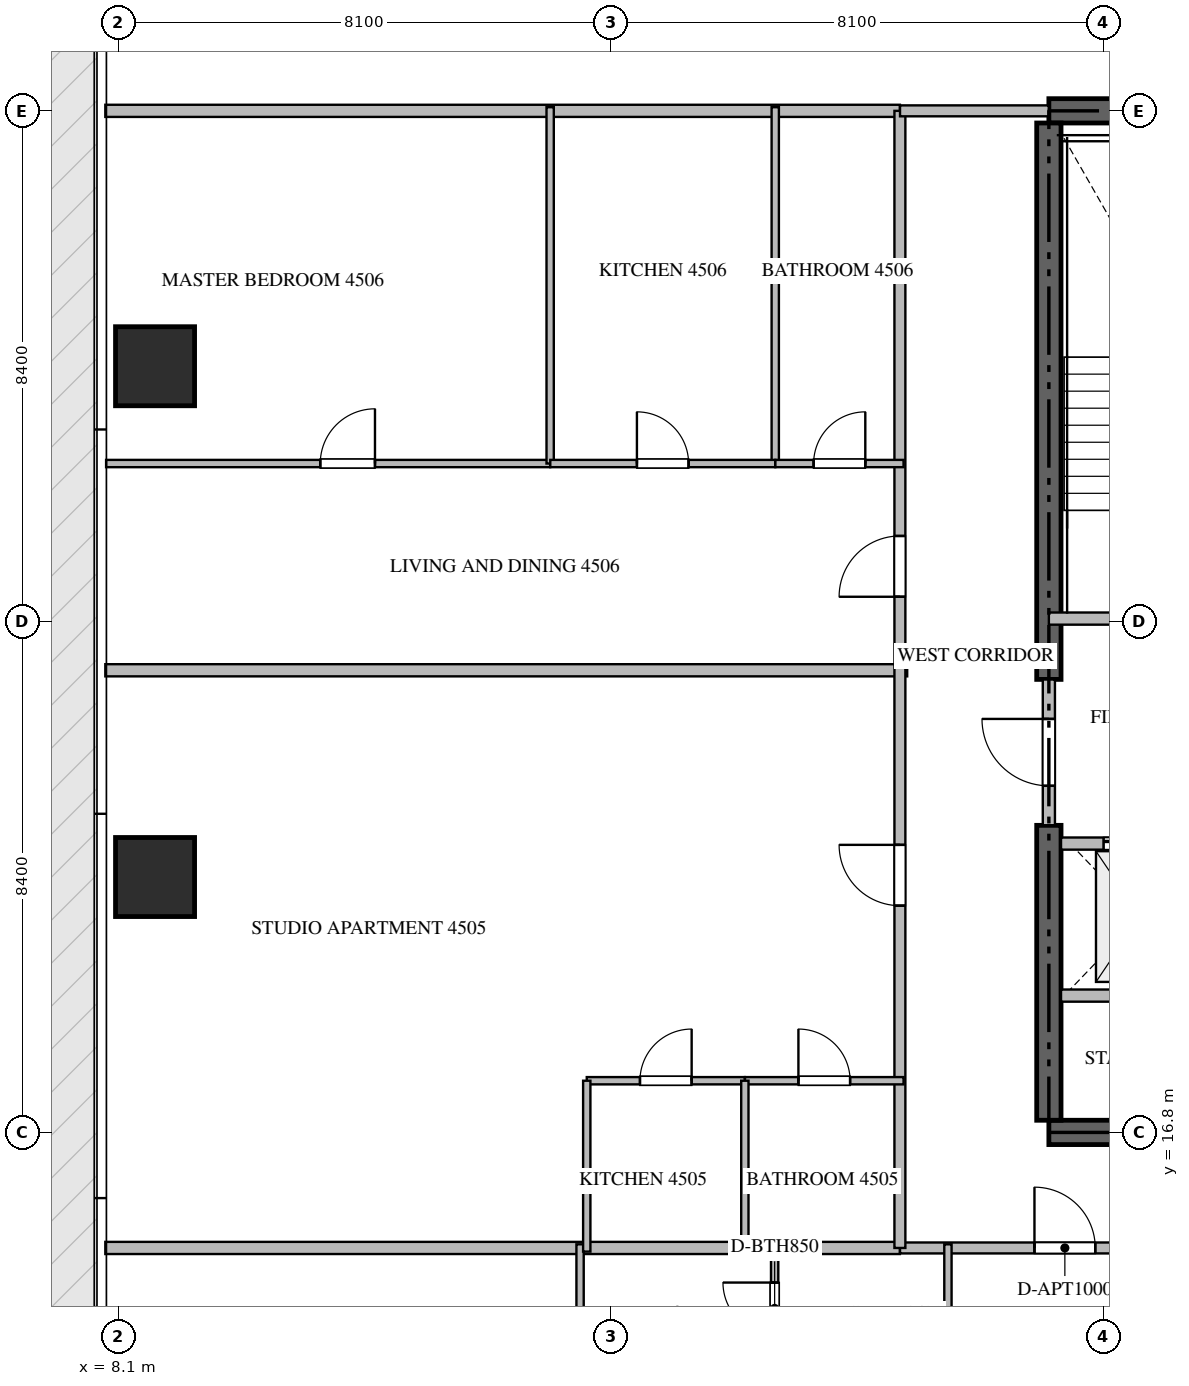
"""IFC4 building model, lengths in metres.
Left out: names, types, materials, properties, quantities, classifications, styles, units other than length and angle.
Written with IfcOpenShell. Run it as: python <this file> out.ifc"""

import sys

from ifc_helpers import new_model, si_unit, direction, frame, frame_2d, origin, origin_2d, place, context, subcontext, project, spatial, rectangle, extrude, source, transform, mapped, element, fill, save


model = new_model("IFC4")
c1 = context("Model", 3, precision=1e-05, world=origin(), true_north=direction((0.0, 1.0)))
c2 = subcontext(c1, "Body", "Model", "MODEL_VIEW")
j1 = project(units=[si_unit("LENGTHUNIT", "METRE"), si_unit("PLANEANGLEUNIT", "RADIAN")], contexts=[c1])
p1 = place(None, origin())
s1 = spatial("IfcSite", under=j1, at=p1, CompositionType="ELEMENT")
p2 = place(p1, origin())
s2 = spatial("IfcBuilding", under=s1, at=p2, CompositionType="ELEMENT")
p3 = place(p2, frame((0.0, 0.0, 180.15)))
s3 = spatial("IfcBuildingStorey", under=s2, at=p3, CompositionType="ELEMENT", Elevation=180.15)
for number, where, z_axis, x_axis in (
    (1, (23.4, 16.8, -0.26), (0.0, 0.0, 1.0), (1.0, 0.0, 0.0)),
    (2, (41.4, 33.6, -0.26), (0.0, 0.0, 1.0), (-1.0, 0.0, 0.0)),
):
    element("IfcWall", number, at=place(p3, frame(where, z_axis=z_axis, x_axis=x_axis)), inside=s3, PredefinedType="SHEAR", context=c2, shape_type="SweptSolid", body=[
        extrude(rectangle(XDim=18.0, YDim=0.4, at=frame_2d((9.0, 0.0))), origin(), (0.0, 0.0, 1.0), 3.748),
    ])
p4 = place(p3, frame((23.4, 17.0, -0.26), z_axis=(0.0, 0.0, 1.0), x_axis=(0.0, 1.0, 0.0)))
e3 = element("IfcWall", 3, at=p4, inside=s3, PredefinedType="SHEAR", context=c2, shape_type="SweptSolid", body=[
    extrude(rectangle(XDim=4.85, YDim=0.4, at=frame_2d((2.425, 0.0))), origin(), (0.0, 0.0, 1.0), 3.748),
])
p5 = place(p3, frame((23.4, 24.25, -0.26), z_axis=(0.0, 0.0, 1.0), x_axis=(0.0, 1.0, 0.0)))
e4 = element("IfcWall", 4, at=p5, inside=s3, PredefinedType="SHEAR", context=c2, shape_type="SweptSolid", body=[
    extrude(rectangle(XDim=9.15, YDim=0.4, at=frame_2d((4.575, 0.0))), origin(), (0.0, 0.0, 1.0), 3.748),
])
m1 = source(origin(), c2, "Body", "SweptSolid", [
    extrude(rectangle(XDim=1.3, YDim=1.3, at=origin_2d()), origin(), (0.0, 0.0, 1.0), 3.75),
])
for number, where, z_axis, x_axis in (
    (5, (8.7, 21.0, -0.26), (0.0, 0.0, 1.0), (1.0, 0.0, 0.0)),
    (6, (8.7, 29.4, -0.26), (0.0, 0.0, 1.0), (1.0, 0.0, 0.0)),
):
    element("IfcColumn", number, at=place(p3, frame(where, z_axis=z_axis, x_axis=x_axis)), inside=s3, PredefinedType="COLUMN", context=c2, shape_type="MappedRepresentation", body=[
        mapped(m1, transform((0.0, 0.0, 0.0), scale=1.0)),
    ])
p6 = place(p3, frame((23.4, 25.25, 0.0), z_axis=(0.0, 0.0, 1.0), x_axis=(1.0, 0.0, 0.0)))
e7 = element("IfcWall", 7, at=p6, inside=s3, PredefinedType="STANDARD", context=c2, shape_type="SweptSolid", body=[
    extrude(rectangle(XDim=4.45, YDim=0.2, at=frame_2d((2.225, 0.0))), origin(), (0.0, 0.0, 1.0), 3.49),
])
p7 = place(p6, frame((1.65, 0.0, 0.0)))
e8 = element("IfcOpeningElement", 8, at=p7, cuts=e7, PredefinedType="OPENING", context=c2, shape_type="SweptSolid", body=[
    extrude(rectangle(XDim=1.1, YDim=2.15, at=frame_2d((0.55, 1.075))), frame((0.0, 0.11, 0.0), z_axis=(0.0, -1.0, 0.0), x_axis=(1.0, 0.0, 0.0)), (0.0, 0.0, 1.0), 0.22),
])
p8 = place(p3, frame((23.6, 21.55, 0.0), z_axis=(0.0, 0.0, 1.0), x_axis=(1.0, 0.0, 0.0)))
e9 = element("IfcWall", 9, at=p8, inside=s3, PredefinedType="STANDARD", context=c2, shape_type="SweptSolid", body=[
    extrude(rectangle(XDim=2.45, YDim=0.2, at=frame_2d((1.225, 0.0))), origin(), (0.0, 0.0, 1.0), 3.49),
])
p9 = place(p8, frame((0.7, 0.0, 0.0)))
e10 = element("IfcOpeningElement", 10, at=p9, cuts=e9, PredefinedType="OPENING", context=c2, shape_type="SweptSolid", body=[
    extrude(rectangle(XDim=1.2, YDim=2.2, at=frame_2d((0.6, 1.1))), frame((0.0, 0.11, 0.0), z_axis=(0.0, -1.0, 0.0), x_axis=(1.0, 0.0, 0.0)), (0.0, 0.0, 1.0), 0.22),
])
p10 = place(p3, frame((23.6, 19.05, 0.0), z_axis=(0.0, 0.0, 1.0), x_axis=(1.0, 0.0, 0.0)))
e11 = element("IfcWall", 11, at=p10, inside=s3, PredefinedType="STANDARD", context=c2, shape_type="SweptSolid", body=[
    extrude(rectangle(XDim=2.45, YDim=0.2, at=frame_2d((1.225, 0.0))), origin(), (0.0, 0.0, 1.0), 3.49),
])
p11 = place(p3, frame((23.4, 21.852, 0.0), z_axis=(0.0, 0.0, 1.0), x_axis=(0.0, 1.0, 0.0)))
e12 = element("IfcWall", 12, at=p11, inside=s3, PredefinedType="STANDARD", context=c2, shape_type="SweptSolid", body=[
    extrude(rectangle(XDim=2.396, YDim=0.2, at=frame_2d((1.198, 0.0))), origin(), (0.0, 0.0, 1.0), 3.49),
])
p12 = place(p11, frame((0.648, 0.0, 0.0)))
e13 = element("IfcOpeningElement", 13, at=p12, cuts=e12, PredefinedType="OPENING", context=c2, shape_type="SweptSolid", body=[
    extrude(rectangle(XDim=1.1, YDim=2.15, at=frame_2d((0.55, 1.075))), frame((0.0, 0.11, 0.0), z_axis=(0.0, -1.0, 0.0), x_axis=(1.0, 0.0, 0.0)), (0.0, 0.0, 1.0), 0.22),
])
p13 = place(p3, frame((7.882, 24.4, 0.0), z_axis=(0.0, 0.0, 1.0), x_axis=(1.0, 0.0, 0.0)))
e14 = element("IfcWall", 14, at=p13, inside=s3, PredefinedType="PARTITIONING", context=c2, shape_type="SweptSolid", body=[
    extrude(rectangle(XDim=13.188, YDim=0.2, at=frame_2d((6.594, 0.0))), origin(), (0.0, 0.0, 1.0), 3.49),
])
for number, where, z_axis, x_axis in (
    (15, (7.882, 14.9, 0.0), (0.0, 0.0, 1.0), (1.0, 0.0, 0.0)),
    (16, (7.882, 33.6, 0.0), (0.0, 0.0, 1.0), (1.0, 0.0, 0.0)),
):
    element("IfcWall", number, at=place(p3, frame(where, z_axis=z_axis, x_axis=x_axis)), inside=s3, PredefinedType="PARTITIONING", context=c2, shape_type="SweptSolid", body=[
        extrude(rectangle(XDim=13.068, YDim=0.2, at=frame_2d((6.534, 0.0))), origin(), (0.0, 0.0, 1.0), 3.49),
    ])
p14 = place(p3, frame((20.952, 14.9, 0.0), z_axis=(0.0, 0.0, 1.0), x_axis=(1.0, 0.0, 0.0)))
e17 = element("IfcWall", 17, at=p14, inside=s3, PredefinedType="PARTITIONING", context=c2, shape_type="SweptSolid", body=[
    extrude(rectangle(XDim=22.896, YDim=0.18, at=frame_2d((11.448, 0.0))), origin(), (0.0, 0.0, 1.0), 3.49),
])
p15 = place(p14, frame((2.211, 0.0, 0.0)))
e18 = element("IfcOpeningElement", 18, at=p15, cuts=e17, PredefinedType="OPENING", context=c2, shape_type="SweptSolid", body=[
    extrude(rectangle(XDim=1.0, YDim=2.15, at=frame_2d((0.5, 1.075))), frame((0.0, 0.1, 0.0), z_axis=(0.0, -1.0, 0.0), x_axis=(1.0, 0.0, 0.0)), (0.0, 0.0, 1.0), 0.2),
])
p16 = place(p14, frame((6.7, 0.0, 0.0)))
e19 = element("IfcOpeningElement", 19, at=p16, cuts=e17, PredefinedType="OPENING", context=c2, shape_type="SweptSolid", body=[
    extrude(rectangle(XDim=1.0, YDim=2.15, at=frame_2d((0.5, 1.075))), frame((0.0, 0.1, 0.0), z_axis=(0.0, -1.0, 0.0), x_axis=(1.0, 0.0, 0.0)), (0.0, 0.0, 1.0), 0.2),
])
p17 = place(p14, frame((19.509, 0.0, 0.0)))
e20 = element("IfcOpeningElement", 20, at=p17, cuts=e17, PredefinedType="OPENING", context=c2, shape_type="SweptSolid", body=[
    extrude(rectangle(XDim=1.0, YDim=2.15, at=frame_2d((0.5, 1.075))), frame((0.0, 0.1, 0.0), z_axis=(0.0, -1.0, 0.0), x_axis=(1.0, 0.0, 0.0)), (0.0, 0.0, 1.0), 0.2),
])
p18 = place(p3, frame((20.95, 14.9, 0.0), z_axis=(0.0, 0.0, 1.0), x_axis=(0.0, 1.0, 0.0)))
e21 = element("IfcWall", 21, at=p18, inside=s3, PredefinedType="PARTITIONING", context=c2, shape_type="SweptSolid", body=[
    extrude(rectangle(XDim=18.7, YDim=0.18, at=frame_2d((9.35, 0.0))), origin(), (0.0, 0.0, 1.0), 3.49),
])
p19 = place(p18, frame((5.629, 0.0, 0.0)))
e22 = element("IfcOpeningElement", 22, at=p19, cuts=e21, PredefinedType="OPENING", context=c2, shape_type="SweptSolid", body=[
    extrude(rectangle(XDim=1.0, YDim=2.15, at=frame_2d((0.5, 1.075))), frame((0.0, 0.1, 0.0), z_axis=(0.0, -1.0, 0.0), x_axis=(1.0, 0.0, 0.0)), (0.0, 0.0, 1.0), 0.2),
])
p20 = place(p18, frame((10.709, 0.0, 0.0)))
e23 = element("IfcOpeningElement", 23, at=p20, cuts=e21, PredefinedType="OPENING", context=c2, shape_type="SweptSolid", body=[
    extrude(rectangle(XDim=1.0, YDim=2.15, at=frame_2d((0.5, 1.075))), frame((0.0, 0.1, 0.0), z_axis=(0.0, -1.0, 0.0), x_axis=(1.0, 0.0, 0.0)), (0.0, 0.0, 1.0), 0.2),
])
p21 = place(p3, frame((20.952, 33.6, 0.0), z_axis=(0.0, 0.0, 1.0), x_axis=(1.0, 0.0, 0.0)))
e24 = element("IfcWall", 24, at=p21, inside=s3, PredefinedType="PARTITIONING", context=c2, shape_type="SweptSolid", body=[
    extrude(rectangle(XDim=2.446, YDim=0.18, at=frame_2d((1.223, 0.0))), origin(), (0.0, 0.0, 1.0), 3.49),
])
p22 = place(p3, frame((21.74, 12.15, 0.0), z_axis=(0.0, 0.0, 1.0), x_axis=(0.0, 1.0, 0.0)))
e25 = element("IfcWall", 25, at=p22, inside=s3, PredefinedType="PARTITIONING", context=c2, shape_type="SweptSolid", body=[
    extrude(rectangle(XDim=2.81, YDim=0.12, at=frame_2d((1.405, 0.0))), origin(), (0.0, 0.0, 1.0), 3.49),
])
p23 = place(p3, frame((15.69, 12.85, 0.0), z_axis=(0.0, 0.0, 1.0), x_axis=(0.0, 1.0, 0.0)))
e26 = element("IfcWall", 26, at=p23, inside=s3, PredefinedType="PARTITIONING", context=c2, shape_type="SweptSolid", body=[
    extrude(rectangle(XDim=2.11, YDim=0.12, at=frame_2d((1.055, 0.0))), origin(), (0.0, 0.0, 1.0), 3.49),
])
p24 = place(p3, frame((18.89, 12.852, 0.0), z_axis=(0.0, 0.0, 1.0), x_axis=(0.0, 1.0, 0.0)))
e27 = element("IfcWall", 27, at=p24, inside=s3, PredefinedType="PARTITIONING", context=c2, shape_type="SweptSolid", body=[
    extrude(rectangle(XDim=2.108, YDim=0.12, at=frame_2d((1.054, 0.0))), origin(), (0.0, 0.0, 1.0), 3.49),
])
p25 = place(p24, frame((0.629, 0.0, 0.0)))
e28 = element("IfcOpeningElement", 28, at=p25, cuts=e27, PredefinedType="OPENING", context=c2, shape_type="SweptSolid", body=[
    extrude(rectangle(XDim=0.85, YDim=2.1, at=frame_2d((0.425, 1.05))), frame((0.0, 0.07, 0.0), z_axis=(0.0, -1.0, 0.0), x_axis=(1.0, 0.0, 0.0)), (0.0, 0.0, 1.0), 0.14),
])
p26 = place(p3, frame((15.8, 17.65, 0.0), z_axis=(0.0, 0.0, 1.0), x_axis=(1.0, 0.0, 0.0)))
e29 = element("IfcWall", 29, at=p26, inside=s3, PredefinedType="PARTITIONING", context=c2, shape_type="SweptSolid", body=[
    extrude(rectangle(XDim=2.6, YDim=0.12, at=frame_2d((1.3, 0.0))), origin(), (0.0, 0.0, 1.0), 3.49),
])
p27 = place(p26, frame((0.875, 0.0, 0.0)))
e30 = element("IfcOpeningElement", 30, at=p27, cuts=e29, PredefinedType="OPENING", context=c2, shape_type="SweptSolid", body=[
    extrude(rectangle(XDim=0.85, YDim=2.1, at=frame_2d((0.425, 1.05))), frame((0.0, 0.07, 0.0), z_axis=(0.0, -1.0, 0.0), x_axis=(1.0, 0.0, 0.0)), (0.0, 0.0, 1.0), 0.14),
])
p28 = place(p3, frame((18.402, 17.65, 0.0), z_axis=(0.0, 0.0, 1.0), x_axis=(1.0, 0.0, 0.0)))
e31 = element("IfcWall", 31, at=p28, inside=s3, PredefinedType="PARTITIONING", context=c2, shape_type="SweptSolid", body=[
    extrude(rectangle(XDim=2.608, YDim=0.12, at=frame_2d((1.304, 0.0))), origin(), (0.0, 0.0, 1.0), 3.49),
])
p29 = place(p28, frame((0.879, 0.0, 0.0)))
e32 = element("IfcOpeningElement", 32, at=p29, cuts=e31, PredefinedType="OPENING", context=c2, shape_type="SweptSolid", body=[
    extrude(rectangle(XDim=0.85, YDim=2.1, at=frame_2d((0.425, 1.05))), frame((0.0, 0.07, 0.0), z_axis=(0.0, -1.0, 0.0), x_axis=(1.0, 0.0, 0.0)), (0.0, 0.0, 1.0), 0.14),
])
for number, where, z_axis, x_axis in (
    (33, (18.4, 14.84, 0.0), (0.0, 0.0, 1.0), (0.0, 1.0, 0.0)),
    (34, (15.8, 14.84, 0.0), (0.0, 0.0, 1.0), (0.0, 1.0, 0.0)),
):
    element("IfcWall", number, at=place(p3, frame(where, z_axis=z_axis, x_axis=x_axis)), inside=s3, PredefinedType="PARTITIONING", context=c2, shape_type="SweptSolid", body=[
        extrude(rectangle(XDim=2.81, YDim=0.12, at=frame_2d((1.405, 0.0))), origin(), (0.0, 0.0, 1.0), 3.49),
    ])
p30 = place(p3, frame((7.895, 27.8, 0.0), z_axis=(0.0, 0.0, 1.0), x_axis=(1.0, 0.0, 0.0)))
e35 = element("IfcWall", 35, at=p30, inside=s3, PredefinedType="PARTITIONING", context=c2, shape_type="SweptSolid", body=[
    extrude(rectangle(XDim=7.303, YDim=0.12, at=frame_2d((3.651, 0.0))), origin(), (0.0, 0.0, 1.0), 3.49),
])
p31 = place(p30, frame((3.522, 0.0, 0.0)))
e36 = element("IfcOpeningElement", 36, at=p31, cuts=e35, PredefinedType="OPENING", context=c2, shape_type="SweptSolid", body=[
    extrude(rectangle(XDim=0.9, YDim=2.1, at=frame_2d((0.45, 1.05))), frame((0.0, 0.07, 0.0), z_axis=(0.0, -1.0, 0.0), x_axis=(1.0, 0.0, 0.0)), (0.0, 0.0, 1.0), 0.14),
])
for number, where, z_axis, x_axis in (
    (37, (15.198, 27.8, 0.0), (0.0, 0.0, 1.0), (0.0, 1.0, 0.0)),
    (38, (18.9, 27.8, 0.0), (0.0, 0.0, 1.0), (0.0, 1.0, 0.0)),
):
    element("IfcWall", number, at=place(p3, frame(where, z_axis=z_axis, x_axis=x_axis)), inside=s3, PredefinedType="PARTITIONING", context=c2, shape_type="SweptSolid", body=[
        extrude(rectangle(XDim=5.86, YDim=0.12, at=frame_2d((2.93, 0.0))), origin(), (0.0, 0.0, 1.0), 3.49),
    ])
p32 = place(p3, frame((15.2, 27.8, 0.0), z_axis=(0.0, 0.0, 1.0), x_axis=(1.0, 0.0, 0.0)))
e39 = element("IfcWall", 39, at=p32, inside=s3, PredefinedType="PARTITIONING", context=c2, shape_type="SweptSolid", body=[
    extrude(rectangle(XDim=3.7, YDim=0.12, at=frame_2d((1.85, 0.0))), origin(), (0.0, 0.0, 1.0), 3.49),
])
p33 = place(p32, frame((1.425, 0.0, 0.0)))
e40 = element("IfcOpeningElement", 40, at=p33, cuts=e39, PredefinedType="OPENING", context=c2, shape_type="SweptSolid", body=[
    extrude(rectangle(XDim=0.85, YDim=2.1, at=frame_2d((0.425, 1.05))), frame((0.0, 0.07, 0.0), z_axis=(0.0, -1.0, 0.0), x_axis=(1.0, 0.0, 0.0)), (0.0, 0.0, 1.0), 0.14),
])
p34 = place(p3, frame((18.902, 27.8, 0.0), z_axis=(0.0, 0.0, 1.0), x_axis=(1.0, 0.0, 0.0)))
e41 = element("IfcWall", 41, at=p34, inside=s3, PredefinedType="PARTITIONING", context=c2, shape_type="SweptSolid", body=[
    extrude(rectangle(XDim=2.108, YDim=0.12, at=frame_2d((1.054, 0.0))), origin(), (0.0, 0.0, 1.0), 3.49),
])
p35 = place(p34, frame((0.629, 0.0, 0.0)))
e42 = element("IfcOpeningElement", 42, at=p35, cuts=e41, PredefinedType="OPENING", context=c2, shape_type="SweptSolid", body=[
    extrude(rectangle(XDim=0.85, YDim=2.1, at=frame_2d((0.425, 1.05))), frame((0.0, 0.07, 0.0), z_axis=(0.0, -1.0, 0.0), x_axis=(1.0, 0.0, 0.0)), (0.0, 0.0, 1.0), 0.14),
])
m2 = source(origin(), c2, "Body", "SweptSolid", [
    extrude(rectangle(XDim=1.2, YDim=2.2, at=frame_2d((0.6, 1.1))), frame((0.0, 0.025, 0.0), z_axis=(0.0, -1.0, 0.0), x_axis=(1.0, 0.0, 0.0)), (0.0, 0.0, 1.0), 0.05),
])
p36 = place(p9, origin())
e43 = element("IfcDoor", 43, at=p36, inside=s3, OperationType="DOUBLE_DOOR_SLIDING", PredefinedType="DOOR", context=c2, shape_type="MappedRepresentation", body=[
    mapped(m2, transform((0.0, 0.0, 0.0), scale=1.0)),
])
fill(e10, e43)
m3 = source(origin(), c2, "Body", "SweptSolid", [
    extrude(rectangle(XDim=1.1, YDim=2.15, at=frame_2d((0.55, 1.075))), frame((0.0, 0.025, 0.0), z_axis=(0.0, -1.0, 0.0), x_axis=(1.0, 0.0, 0.0)), (0.0, 0.0, 1.0), 0.05),
])
p37 = place(p12, origin())
e44 = element("IfcDoor", 44, at=p37, inside=s3, OperationType="SINGLE_SWING_RIGHT", PredefinedType="DOOR", context=c2, shape_type="MappedRepresentation", body=[
    mapped(m3, transform((0.0, 0.0, 0.0), scale=1.0)),
])
fill(e13, e44)
m4 = source(origin(), c2, "Body", "SweptSolid", [
    extrude(rectangle(XDim=1.0, YDim=2.15, at=frame_2d((0.5, 1.075))), frame((0.0, 0.025, 0.0), z_axis=(0.0, -1.0, 0.0), x_axis=(1.0, 0.0, 0.0)), (0.0, 0.0, 1.0), 0.05),
])
p38 = place(p15, origin())
e45 = element("IfcDoor", 45, at=p38, inside=s3, OperationType="SINGLE_SWING_LEFT", PredefinedType="DOOR", context=c2, shape_type="MappedRepresentation", body=[
    mapped(m4, transform((0.0, 0.0, 0.0), scale=1.0)),
])
fill(e18, e45)
p39 = place(p19, origin())
e46 = element("IfcDoor", 46, at=p39, inside=s3, OperationType="SINGLE_SWING_RIGHT", PredefinedType="DOOR", context=c2, shape_type="MappedRepresentation", body=[
    mapped(m4, transform((0.0, 0.0, 0.0), scale=1.0)),
])
fill(e22, e46)
p40 = place(p20, origin())
e47 = element("IfcDoor", 47, at=p40, inside=s3, OperationType="SINGLE_SWING_LEFT", PredefinedType="DOOR", context=c2, shape_type="MappedRepresentation", body=[
    mapped(m4, transform((0.0, 0.0, 0.0), scale=1.0)),
])
fill(e23, e47)
m5 = source(origin(), c2, "Body", "SweptSolid", [
    extrude(rectangle(XDim=0.85, YDim=2.1, at=frame_2d((0.425, 1.05))), frame((0.0, 0.025, 0.0), z_axis=(0.0, -1.0, 0.0), x_axis=(1.0, 0.0, 0.0)), (0.0, 0.0, 1.0), 0.05),
])
p41 = place(p25, origin())
e48 = element("IfcDoor", 48, at=p41, inside=s3, OperationType="SINGLE_SWING_RIGHT", PredefinedType="DOOR", context=c2, shape_type="MappedRepresentation", body=[
    mapped(m5, transform((0.0, 0.0, 0.0), scale=1.0)),
])
fill(e28, e48)
p42 = place(p27, origin())
e49 = element("IfcDoor", 49, at=p42, inside=s3, OperationType="SINGLE_SWING_RIGHT", PredefinedType="DOOR", context=c2, shape_type="MappedRepresentation", body=[
    mapped(m5, transform((0.0, 0.0, 0.0), scale=1.0)),
])
fill(e30, e49)
p43 = place(p29, origin())
e50 = element("IfcDoor", 50, at=p43, inside=s3, OperationType="SINGLE_SWING_LEFT", PredefinedType="DOOR", context=c2, shape_type="MappedRepresentation", body=[
    mapped(m5, transform((0.0, 0.0, 0.0), scale=1.0)),
])
fill(e32, e50)
m6 = source(origin(), c2, "Body", "SweptSolid", [
    extrude(rectangle(XDim=0.9, YDim=2.1, at=frame_2d((0.45, 1.05))), frame((0.0, 0.025, 0.0), z_axis=(0.0, -1.0, 0.0), x_axis=(1.0, 0.0, 0.0)), (0.0, 0.0, 1.0), 0.05),
])
p44 = place(p31, origin())
e51 = element("IfcDoor", 51, at=p44, inside=s3, OperationType="SINGLE_SWING_RIGHT", PredefinedType="DOOR", context=c2, shape_type="MappedRepresentation", body=[
    mapped(m6, transform((0.0, 0.0, 0.0), scale=1.0)),
])
fill(e36, e51)
p45 = place(p33, origin())
e52 = element("IfcDoor", 52, at=p45, inside=s3, OperationType="SINGLE_SWING_LEFT", PredefinedType="DOOR", context=c2, shape_type="MappedRepresentation", body=[
    mapped(m5, transform((0.0, 0.0, 0.0), scale=1.0)),
])
fill(e40, e52)
p46 = place(p35, origin())
e53 = element("IfcDoor", 53, at=p46, inside=s3, OperationType="SINGLE_SWING_RIGHT", PredefinedType="DOOR", context=c2, shape_type="MappedRepresentation", body=[
    mapped(m5, transform((0.0, 0.0, 0.0), scale=1.0)),
])
fill(e42, e53)
save(model, sys.argv[1])
